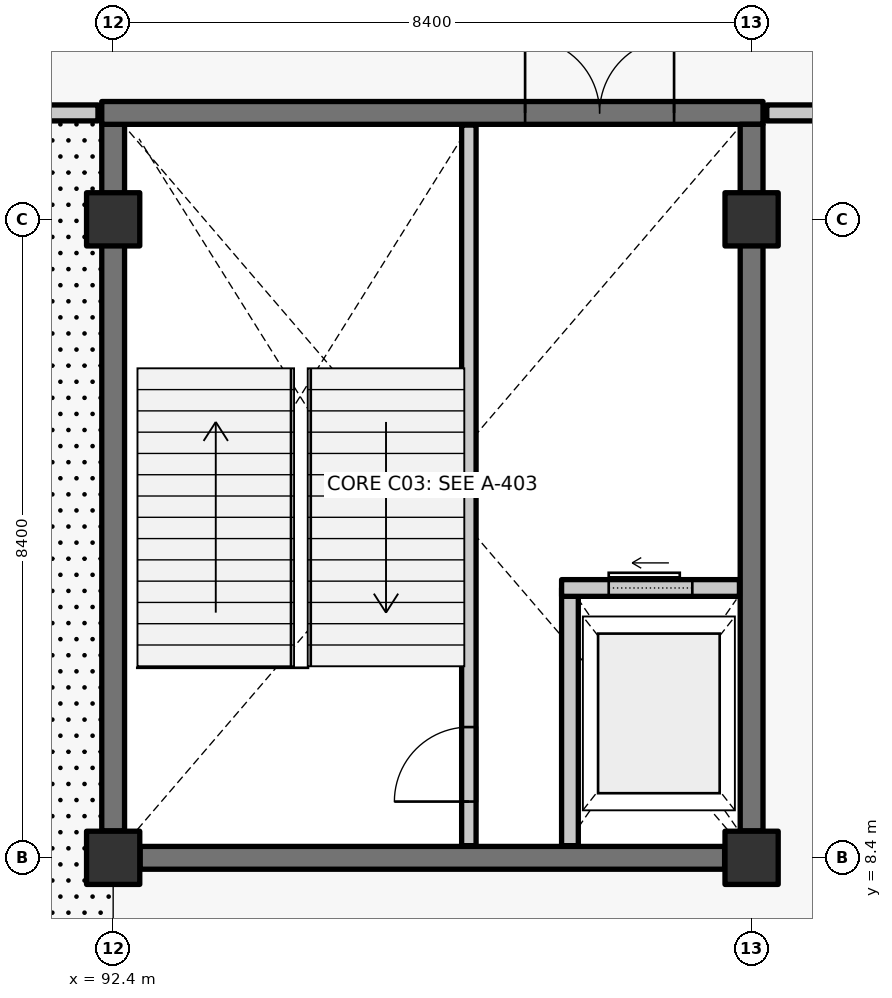
"""IFC4 building model, lengths in metres.
Left out: names, types, materials, properties, quantities, classifications, styles, units other than length and angle.
Written with IfcOpenShell. Run it as: python <this file> out.ifc"""

import sys

from ifc_helpers import new_model, si_unit, direction, frame, frame_2d, origin, origin_2d, place, context, subcontext, project, spatial, rectangle, extrude, element, fill, save


model = new_model("IFC4")
c1 = context("Model", 3, precision=1e-05, world=origin(), true_north=direction((0.0, 1.0)))
c2 = subcontext(c1, "Body", "Model", "MODEL_VIEW")
j1 = project(units=[si_unit("LENGTHUNIT", "METRE"), si_unit("PLANEANGLEUNIT", "RADIAN")], contexts=[c1])
p1 = place(None, origin())
s1 = spatial("IfcSite", under=j1, at=p1, CompositionType="ELEMENT")
p2 = place(p1, origin())
s2 = spatial("IfcBuilding", under=s1, at=p2, CompositionType="ELEMENT")
p3 = place(p2, frame((0.0, 0.0, 11.4)))
s3 = spatial("IfcBuildingStorey", under=s2, at=p3, CompositionType="ELEMENT", Elevation=11.4)
for number, where, z_axis, x_axis in (
    (1, (92.4, 8.4, 0.0), (0.0, 0.0, 1.0), (1.0, 0.0, 0.0)),
    (2, (92.4, 16.8, 0.0), (0.0, 0.0, 1.0), (1.0, 0.0, 0.0)),
    (3, (100.8, 8.4, 0.0), (0.0, 0.0, 1.0), (1.0, 0.0, 0.0)),
    (4, (100.8, 16.8, 0.0), (0.0, 0.0, 1.0), (1.0, 0.0, 0.0)),
):
    element("IfcColumn", number, at=place(p3, frame(where, z_axis=z_axis, x_axis=x_axis)), inside=s3, PredefinedType="COLUMN", context=c2, shape_type="SweptSolid", body=[
        extrude(rectangle(XDim=0.7, YDim=0.7, at=origin_2d()), origin(), (0.0, 0.0, 1.0), 4.8),
    ])
p4 = place(p3, frame((100.445, 8.4, 0.0), z_axis=(0.0, 0.0, 1.0), x_axis=(-1.0, 0.0, 0.0)))
e5 = element("IfcWall", 5, at=p4, inside=s3, PredefinedType="SHEAR", context=c2, shape_type="SweptSolid", body=[
    extrude(rectangle(XDim=7.69, YDim=0.3, at=frame_2d((3.845, 0.0))), origin(), (0.0, 0.0, 1.0), 4.52),
])
p5 = place(p3, frame((92.4, 8.755, 0.0), z_axis=(0.0, 0.0, 1.0), x_axis=(0.0, 1.0, 0.0)))
e6 = element("IfcWall", 6, at=p5, inside=s3, PredefinedType="SHEAR", context=c2, shape_type="SweptSolid", body=[
    extrude(rectangle(XDim=9.295, YDim=0.3, at=frame_2d((4.647, 0.0))), origin(), (0.0, 0.0, 1.0), 4.52),
])
p6 = place(p3, frame((92.25, 18.2, 0.0), z_axis=(0.0, 0.0, 1.0), x_axis=(1.0, 0.0, 0.0)))
e7 = element("IfcWall", 7, at=p6, inside=s3, PredefinedType="SHEAR", context=c2, shape_type="SweptSolid", body=[
    extrude(rectangle(XDim=8.7, YDim=0.3, at=frame_2d((4.35, 0.0))), origin(), (0.0, 0.0, 1.0), 4.52),
])
p7 = place(p6, frame((5.57, 0.0, 0.0)))
e8 = element("IfcOpeningElement", 8, at=p7, cuts=e7, PredefinedType="OPENING", context=c2, shape_type="SweptSolid", body=[
    extrude(rectangle(XDim=1.96, YDim=2.2, at=frame_2d((0.98, 1.1))), frame((0.0, 0.16, 0.0), z_axis=(0.0, -1.0, 0.0), x_axis=(1.0, 0.0, 0.0)), (0.0, 0.0, 1.0), 0.32),
])
p8 = place(p3, frame((100.8, 18.05, 0.0), z_axis=(0.0, 0.0, 1.0), x_axis=(0.0, -1.0, 0.0)))
e9 = element("IfcWall", 9, at=p8, inside=s3, PredefinedType="SHEAR", context=c2, shape_type="SweptSolid", body=[
    extrude(rectangle(XDim=9.295, YDim=0.3, at=frame_2d((4.647, 0.0))), origin(), (0.0, 0.0, 1.0), 4.52),
])
p9 = place(p3, frame((97.08, 8.56, 0.0), z_axis=(0.0, 0.0, 1.0), x_axis=(0.0, 1.0, 0.0)))
e10 = element("IfcWall", 10, at=p9, inside=s3, PredefinedType="SOLIDWALL", context=c2, shape_type="SweptSolid", body=[
    extrude(rectangle(XDim=9.48, YDim=0.19, at=frame_2d((4.74, 0.0))), origin(), (0.0, 0.0, 1.0), 4.52),
])
p10 = place(p9, frame((0.58, 0.0, 0.0)))
e11 = element("IfcOpeningElement", 11, at=p10, cuts=e10, PredefinedType="OPENING", context=c2, shape_type="SweptSolid", body=[
    extrude(rectangle(XDim=0.98, YDim=2.15, at=frame_2d((0.49, 1.075))), frame((0.0, 0.105, 0.0), z_axis=(0.0, -1.0, 0.0), x_axis=(1.0, 0.0, 0.0)), (0.0, 0.0, 1.0), 0.21),
])
p11 = place(p3, frame((98.41, 8.56, 0.0), z_axis=(0.0, 0.0, 1.0), x_axis=(0.0, 1.0, 0.0)))
e12 = element("IfcWall", 12, at=p11, inside=s3, PredefinedType="SOLIDWALL", context=c2, shape_type="SweptSolid", body=[
    extrude(rectangle(XDim=3.39, YDim=0.22, at=frame_2d((1.695, 0.0))), origin(), (0.0, 0.0, 1.0), 4.52),
])
p12 = place(p3, frame((98.3, 11.95, 0.0), z_axis=(0.0, 0.0, 1.0), x_axis=(1.0, 0.0, 0.0)))
e13 = element("IfcWall", 13, at=p12, inside=s3, PredefinedType="SOLIDWALL", context=c2, shape_type="SweptSolid", body=[
    extrude(rectangle(XDim=2.34, YDim=0.22, at=frame_2d((1.17, 0.0))), origin(), (0.0, 0.0, 1.0), 4.52),
])
p13 = place(p12, frame((0.62, 0.0, 0.0)))
e14 = element("IfcOpeningElement", 14, at=p13, cuts=e13, PredefinedType="OPENING", context=c2, shape_type="SweptSolid", body=[
    extrude(rectangle(XDim=1.1, YDim=2.2, at=frame_2d((0.55, 1.1))), frame((0.0, 0.12, 0.0), z_axis=(0.0, -1.0, 0.0), x_axis=(1.0, 0.0, 0.0)), (0.0, 0.0, 1.0), 0.24),
])
p14 = place(p3, frame((75.8, 18.2, 0.0), z_axis=(0.0, 0.0, 1.0), x_axis=(1.0, 0.0, 0.0)))
e15 = element("IfcWall", 15, at=p14, inside=s3, PredefinedType="PARTITIONING", context=c2, shape_type="SweptSolid", body=[
    extrude(rectangle(XDim=16.4, YDim=0.21, at=frame_2d((8.2, 0.0))), origin(), (0.0, 0.0, 1.0), 4.52),
])
p15 = place(p14, frame((3.5, 0.0, 0.0)))
e16 = element("IfcOpeningElement", 16, at=p15, cuts=e15, PredefinedType="OPENING", context=c2, shape_type="SweptSolid", body=[
    extrude(rectangle(XDim=1.0, YDim=2.15, at=frame_2d((0.5, 1.075))), frame((0.0, 0.115, 0.0), z_axis=(0.0, -1.0, 0.0), x_axis=(1.0, 0.0, 0.0)), (0.0, 0.0, 1.0), 0.23),
])
p16 = place(p14, frame((11.9, 0.0, 0.0)))
e17 = element("IfcOpeningElement", 17, at=p16, cuts=e15, PredefinedType="OPENING", context=c2, shape_type="SweptSolid", body=[
    extrude(rectangle(XDim=1.0, YDim=2.15, at=frame_2d((0.5, 1.075))), frame((0.0, 0.115, 0.0), z_axis=(0.0, -1.0, 0.0), x_axis=(1.0, 0.0, 0.0)), (0.0, 0.0, 1.0), 0.23),
])
p17 = place(p3, frame((101.0, 18.2, 0.0), z_axis=(0.0, 0.0, 1.0), x_axis=(1.0, 0.0, 0.0)))
e18 = element("IfcWall", 18, at=p17, inside=s3, PredefinedType="PARTITIONING", context=c2, shape_type="SweptSolid", body=[
    extrude(rectangle(XDim=16.4, YDim=0.21, at=frame_2d((8.2, 0.0))), origin(), (0.0, 0.0, 1.0), 4.52),
])
p18 = place(p17, frame((3.5, 0.0, 0.0)))
e19 = element("IfcOpeningElement", 19, at=p18, cuts=e18, PredefinedType="OPENING", context=c2, shape_type="SweptSolid", body=[
    extrude(rectangle(XDim=1.0, YDim=2.15, at=frame_2d((0.5, 1.075))), frame((0.0, 0.115, 0.0), z_axis=(0.0, -1.0, 0.0), x_axis=(1.0, 0.0, 0.0)), (0.0, 0.0, 1.0), 0.23),
])
p19 = place(p17, frame((11.9, 0.0, 0.0)))
e20 = element("IfcOpeningElement", 20, at=p19, cuts=e18, PredefinedType="OPENING", context=c2, shape_type="SweptSolid", body=[
    extrude(rectangle(XDim=1.0, YDim=2.15, at=frame_2d((0.5, 1.075))), frame((0.0, 0.115, 0.0), z_axis=(0.0, -1.0, 0.0), x_axis=(1.0, 0.0, 0.0)), (0.0, 0.0, 1.0), 0.23),
])
p20 = place(p10, origin())
e21 = element("IfcDoor", 21, at=p20, inside=s3, OperationType="SINGLE_SWING_LEFT", PredefinedType="DOOR", context=c2, shape_type="SweptSolid", body=[
    extrude(rectangle(XDim=0.98, YDim=2.15, at=frame_2d((0.49, 1.075))), frame((0.0, 0.025, 0.0), z_axis=(0.0, -1.0, 0.0), x_axis=(1.0, 0.0, 0.0)), (0.0, 0.0, 1.0), 0.05),
])
fill(e11, e21)
p21 = place(p7, origin())
e22 = element("IfcDoor", 22, at=p21, inside=s3, OperationType="DOUBLE_DOOR_SINGLE_SWING", PredefinedType="DOOR", context=c2, shape_type="SweptSolid", body=[
    extrude(rectangle(XDim=1.96, YDim=2.2, at=frame_2d((0.98, 1.1))), frame((0.0, 0.025, 0.0), z_axis=(0.0, -1.0, 0.0), x_axis=(1.0, 0.0, 0.0)), (0.0, 0.0, 1.0), 0.05),
])
fill(e8, e22)
p22 = place(p13, origin())
e23 = element("IfcDoor", 23, at=p22, inside=s3, OperationType="SLIDING_TO_LEFT", PredefinedType="DOOR", context=c2, shape_type="SweptSolid", body=[
    extrude(rectangle(XDim=1.1, YDim=2.2, at=frame_2d((0.55, 1.1))), frame((0.0, 0.025, 0.0), z_axis=(0.0, -1.0, 0.0), x_axis=(1.0, 0.0, 0.0)), (0.0, 0.0, 1.0), 0.05),
])
fill(e14, e23)
save(model, sys.argv[1])
